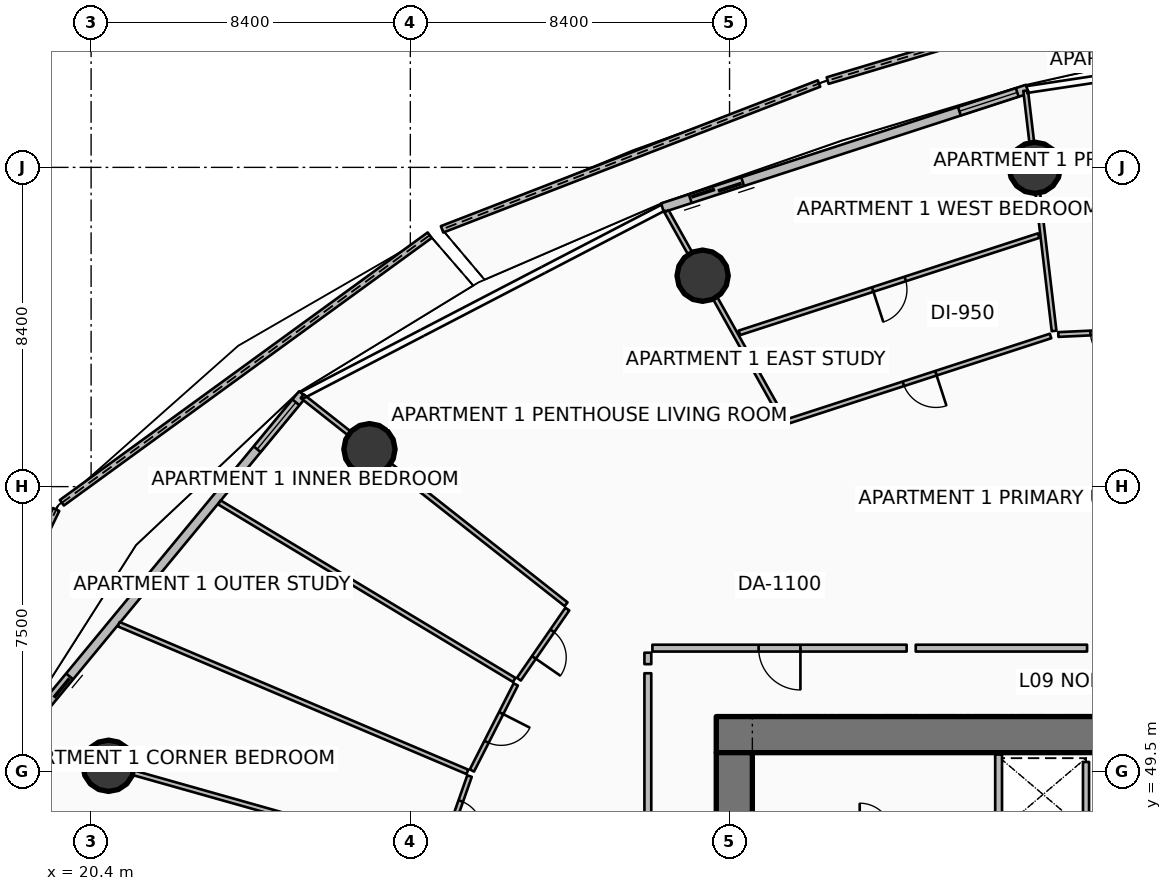
"""IFC4 building model, lengths in metres.
Left out: names, types, materials, properties, quantities, classifications, styles, units other than length and angle.
Written with IfcOpenShell. Run it as: python <this file> out.ifc"""

import sys

from ifc_helpers import new_model, si_unit, direction, frame, frame_2d, origin, origin_2d, place, context, subcontext, project, spatial, polyline, rectangle, circle, outline, extrude, element, fill, save


model = new_model("IFC4")
c1 = context("Model", 3, precision=1e-05, world=origin(), true_north=direction((0.0, 1.0)))
c2 = subcontext(c1, "Body", "Model", "MODEL_VIEW")
j1 = project(units=[si_unit("LENGTHUNIT", "METRE"), si_unit("PLANEANGLEUNIT", "RADIAN")], contexts=[c1])
p1 = place(None, origin())
s1 = spatial("IfcSite", under=j1, at=p1, CompositionType="ELEMENT")
p2 = place(p1, origin())
s2 = spatial("IfcBuilding", under=s1, at=p2, CompositionType="ELEMENT")
p3 = place(p2, frame((0.0, 0.0, 41.4)))
s3 = spatial("IfcBuildingStorey", under=s2, at=p3, CompositionType="ELEMENT", Elevation=41.4)
p4 = place(p3, frame((36.85, 50.475, 0.0), z_axis=(0.0, 0.0, 1.0), x_axis=(1.0, 0.0, 0.0)))
e1 = element("IfcWall", 1, at=p4, inside=s3, PredefinedType="SHEAR", context=c2, shape_type="SweptSolid", body=[
    extrude(rectangle(XDim=10.05, YDim=0.95, at=frame_2d((5.025, 0.0))), origin(), (0.0, 0.0, 1.0), 3.75),
])
p5 = place(p3, frame((37.325, 34.0, 0.0), z_axis=(0.0, 0.0, 1.0), x_axis=(0.0, 1.0, 0.0)))
e2 = element("IfcWall", 2, at=p5, inside=s3, PredefinedType="SHEAR", context=c2, shape_type="SweptSolid", body=[
    extrude(rectangle(XDim=16.0, YDim=0.95, at=frame_2d((8.0, 0.0))), origin(), (0.0, 0.0, 1.0), 3.75),
])
for number, where, z_axis, x_axis in (
    (3, (45.232, 65.389, 0.0), (0.0, 0.0, 1.0), (1.0, 0.0, 0.0)),
    (4, (36.492, 62.55, 0.0), (0.0, 0.0, 1.0), (1.0, 0.0, 0.0)),
    (5, (27.724, 57.984, 0.0), (0.0, 0.0, 1.0), (1.0, 0.0, 0.0)),
    (6, (20.859, 49.655, 0.0), (0.0, 0.0, 1.0), (1.0, 0.0, 0.0)),
):
    element("IfcColumn", number, at=place(p3, frame(where, z_axis=z_axis, x_axis=x_axis)), inside=s3, PredefinedType="COLUMN", context=c2, shape_type="SweptSolid", body=[
        extrude(circle(Radius=0.675, at=origin_2d()), origin(), (0.0, 0.0, 1.0), 3.5),
    ])
p6 = place(p3, frame((50.087, 70.771, 0.0), z_axis=(0.0, 0.0, 1.0), x_axis=(-0.957966698042, -0.286879426664, 0.0)))
e7 = element("IfcWall", 7, at=p6, inside=s3, PredefinedType="PARAPET", context=c2, shape_type="SweptSolid", body=[
    extrude(outline(polyline([(0.0, 0.0), (10.759, 0.0), (10.759, 1.148), (5.379, 1.284), (0.0, 1.483), (0.0, 0.0)])), frame((0.0, 0.09, 0.0), z_axis=(0.0, -1.0, 0.0), x_axis=(1.0, 0.0, 0.0)), (0.0, 0.0, 1.0), 0.18),
])
p7 = place(p3, frame((39.554, 67.606, 0.0), z_axis=(0.0, 0.0, 1.0), x_axis=(-0.932670029618, -0.360730669409, 0.0)))
e8 = element("IfcWall", 8, at=p7, inside=s3, PredefinedType="PARAPET", context=c2, shape_type="SweptSolid", body=[
    extrude(outline(polyline([(0.0, 0.0), (10.635, 0.0), (10.635, 1.224), (5.317, 1.127), (0.0, 1.148), (0.0, 0.0)])), frame((0.0, 0.09, 0.0), z_axis=(0.0, -1.0, 0.0), x_axis=(1.0, 0.0, 0.0)), (0.0, 0.0, 1.0), 0.18),
])
p8 = place(p3, frame((29.309, 63.615, 0.0), z_axis=(0.0, 0.0, 1.0), x_axis=(-0.808711385096, -0.588205657586, 0.0)))
e9 = element("IfcWall", 9, at=p8, inside=s3, PredefinedType="PARAPET", context=c2, shape_type="SweptSolid", body=[
    extrude(outline(polyline([(0.0, 0.0), (11.969, 0.0), (11.969, 1.632), (5.984, 1.418), (0.0, 1.233), (0.0, 0.0)])), frame((0.0, 0.09, 0.0), z_axis=(0.0, -1.0, 0.0), x_axis=(1.0, 0.0, 0.0)), (0.0, 0.0, 1.0), 0.18),
])
p9 = place(p3, frame((19.481, 56.396, 0.0), z_axis=(0.0, 0.0, 1.0), x_axis=(-0.435391138538, -0.900241387897, 0.0)))
e10 = element("IfcWall", 10, at=p9, inside=s3, PredefinedType="PARAPET", context=c2, shape_type="SweptSolid", body=[
    extrude(outline(polyline([(0.0, 0.0), (12.779, 0.0), (12.779, 1.86), (6.39, 1.798), (0.0, 1.632), (0.0, 0.0)])), frame((0.0, 0.09, 0.0), z_axis=(0.0, -1.0, 0.0), x_axis=(1.0, 0.0, 0.0)), (0.0, 0.0, 1.0), 0.18),
])
p10 = place(p3, frame((45.036, 67.458, 0.0), z_axis=(0.0, 0.0, 1.0), x_axis=(-0.951054679225, -0.309022648238, 0.0)))
e11 = element("IfcWall", 11, at=p10, inside=s3, PredefinedType="SOLIDWALL", context=c2, shape_type="SweptSolid", body=[
    extrude(rectangle(XDim=10.097, YDim=0.24, at=frame_2d((5.048, 0.0))), origin(), (0.0, 0.0, 1.0), 2.45),
])
p11 = place(p10, frame((7.877, 0.0, 0.0)))
e12 = element("IfcOpeningElement", 12, at=p11, cuts=e11, PredefinedType="OPENING", context=c2, shape_type="SweptSolid", body=[
    extrude(rectangle(XDim=1.45, YDim=2.15, at=frame_2d((0.725, 1.075))), frame((0.0, 0.13, 0.0), z_axis=(0.0, -1.0, 0.0), x_axis=(1.0, 0.0, 0.0)), (0.0, 0.0, 1.0), 0.26),
])
p12 = place(p10, frame((0.28, 0.0, 0.65)))
e13 = element("IfcOpeningElement", 13, at=p12, cuts=e11, PredefinedType="OPENING", context=c2, shape_type="SweptSolid", body=[
    extrude(rectangle(XDim=1.6, YDim=1.5, at=frame_2d((0.8, 0.75))), frame((0.0, 0.13, 0.0), z_axis=(0.0, -1.0, 0.0), x_axis=(1.0, 0.0, 0.0)), (0.0, 0.0, 1.0), 0.26),
])
p13 = place(p3, frame((25.967, 59.433, 0.0), z_axis=(0.0, 0.0, 1.0), x_axis=(-0.636674332663, -0.771132799281, 0.0)))
e14 = element("IfcWall", 14, at=p13, inside=s3, PredefinedType="SOLIDWALL", context=c2, shape_type="SweptSolid", body=[
    extrude(rectangle(XDim=11.851, YDim=0.24, at=frame_2d((5.926, 0.0))), origin(), (0.0, 0.0, 1.0), 2.45),
])
p14 = place(p13, frame((9.631, 0.0, 0.0)))
e15 = element("IfcOpeningElement", 15, at=p14, cuts=e14, PredefinedType="OPENING", context=c2, shape_type="SweptSolid", body=[
    extrude(rectangle(XDim=1.45, YDim=2.15, at=frame_2d((0.725, 1.075))), frame((0.0, 0.13, 0.0), z_axis=(0.0, -1.0, 0.0), x_axis=(1.0, 0.0, 0.0)), (0.0, 0.0, 1.0), 0.26),
])
p15 = place(p13, frame((0.28, 0.0, 0.65)))
e16 = element("IfcOpeningElement", 16, at=p15, cuts=e14, PredefinedType="OPENING", context=c2, shape_type="SweptSolid", body=[
    extrude(rectangle(XDim=1.6, YDim=1.5, at=frame_2d((0.8, 0.75))), frame((0.0, 0.13, 0.0), z_axis=(0.0, -1.0, 0.0), x_axis=(1.0, 0.0, 0.0)), (0.0, 0.0, 1.0), 0.26),
])
p16 = place(p3, frame((46.58, 48.045, 0.0), z_axis=(0.0, 0.0, 1.0), x_axis=(0.0, 1.0, 0.0)))
e17 = element("IfcWall", 17, at=p16, inside=s3, PredefinedType="PARTITIONING", context=c2, shape_type="SweptSolid", body=[
    extrude(rectangle(XDim=1.71, YDim=0.16, at=frame_2d((0.855, 0.0))), origin(), (0.0, 0.0, 1.0), 3.5),
])
p17 = place(p3, frame((44.28, 47.82, 0.0), z_axis=(0.0, 0.0, 1.0), x_axis=(0.0, 1.0, 0.0)))
e18 = element("IfcWall", 18, at=p17, inside=s3, PredefinedType="PARTITIONING", context=c2, shape_type="SweptSolid", body=[
    extrude(rectangle(XDim=2.13, YDim=0.18, at=frame_2d((1.065, 0.0))), origin(), (0.0, 0.0, 1.0), 3.5),
])
p18 = place(p3, frame((41.86, 52.75, 0.0), z_axis=(0.0, 0.0, 1.0), x_axis=(-1.0, 0.0, 0.0)))
e19 = element("IfcWall", 19, at=p18, inside=s3, PredefinedType="PARTITIONING", context=c2, shape_type="SweptSolid", body=[
    extrude(rectangle(XDim=6.69, YDim=0.18, at=frame_2d((3.345, 0.0))), origin(), (0.0, 0.0, 1.0), 2.867),
])
p19 = place(p18, frame((2.795, 0.0, 0.0)))
e20 = element("IfcOpeningElement", 20, at=p19, cuts=e19, PredefinedType="OPENING", context=c2, shape_type="SweptSolid", body=[
    extrude(rectangle(XDim=1.1, YDim=2.1, at=frame_2d((0.55, 1.05))), frame((0.0, 0.1, 0.0), z_axis=(0.0, -1.0, 0.0), x_axis=(1.0, 0.0, 0.0)), (0.0, 0.0, 1.0), 0.2),
])
p20 = place(p3, frame((35.05, 52.63, 0.0), z_axis=(0.0, 0.0, 1.0), x_axis=(0.0, -1.0, 0.0)))
e21 = element("IfcWall", 21, at=p20, inside=s3, PredefinedType="PARTITIONING", context=c2, shape_type="SweptSolid", body=[
    extrude(rectangle(XDim=0.301, YDim=0.18, at=frame_2d((0.15, 0.0))), origin(), (0.0, 0.0, 1.0), 2.867),
])
p21 = place(p3, frame((48.389, 61.121, 0.0), z_axis=(0.0, 0.0, 1.0), x_axis=(-0.998913125069, -0.046610820248, 0.0)))
e22 = element("IfcWall", 22, at=p21, inside=s3, PredefinedType="PARTITIONING", context=c2, shape_type="SweptSolid", body=[
    extrude(rectangle(XDim=2.54, YDim=0.125, at=frame_2d((1.27, 0.0))), origin(), (0.0, 0.0, 1.0), 2.94),
])
p22 = place(p21, frame((0.845, 0.0, 0.0)))
e23 = element("IfcOpeningElement", 23, at=p22, cuts=e22, PredefinedType="OPENING", context=c2, shape_type="SweptSolid", body=[
    extrude(rectangle(XDim=0.85, YDim=2.06, at=frame_2d((0.425, 1.03))), frame((0.0, 0.073, 0.0), z_axis=(0.0, -1.0, 0.0), x_axis=(1.0, 0.0, 0.0)), (0.0, 0.0, 1.0), 0.145),
])
p23 = place(p3, frame((46.608, 52.75, 0.0), z_axis=(0.0, 0.0, 1.0), x_axis=(-1.0, 0.0, 0.0)))
e24 = element("IfcWall", 24, at=p23, inside=s3, PredefinedType="PARTITIONING", context=c2, shape_type="SweptSolid", body=[
    extrude(rectangle(XDim=4.508, YDim=0.18, at=frame_2d((2.254, 0.0))), origin(), (0.0, 0.0, 1.0), 2.867),
])
p24 = place(p3, frame((45.74, 61.097, 0.0), z_axis=(0.0, 0.0, 1.0), x_axis=(-0.117513247181, 0.993071315031, 0.0)))
e25 = element("IfcWall", 25, at=p24, inside=s3, PredefinedType="PARTITIONING", context=c2, shape_type="SweptSolid", body=[
    extrude(rectangle(XDim=6.366, YDim=0.125, at=frame_2d((3.183, 0.0))), origin(), (0.0, 0.0, 1.0), 2.867),
])
p25 = place(p3, frame((38.604, 58.778, 0.0), z_axis=(0.0, 0.0, 1.0), x_axis=(-0.488617606889, 0.872498042541, 0.0)))
e26 = element("IfcWall", 26, at=p25, inside=s3, PredefinedType="PARTITIONING", context=c2, shape_type="SweptSolid", body=[
    extrude(rectangle(XDim=6.266, YDim=0.125, at=frame_2d((3.133, 0.0))), origin(), (0.0, 0.0, 1.0), 2.867),
])
p26 = place(p3, frame((45.647, 60.963, 0.0), z_axis=(0.0, 0.0, 1.0), x_axis=(-0.95105883225, -0.309009866509, 0.0)))
e27 = element("IfcWall", 27, at=p26, inside=s3, PredefinedType="PARTITIONING", context=c2, shape_type="SweptSolid", body=[
    extrude(rectangle(XDim=7.244, YDim=0.125, at=frame_2d((3.622, 0.0))), origin(), (0.0, 0.0, 1.0), 2.867),
])
p27 = place(p26, frame((3.172, 0.0, 0.0)))
e28 = element("IfcOpeningElement", 28, at=p27, cuts=e27, PredefinedType="OPENING", context=c2, shape_type="SweptSolid", body=[
    extrude(rectangle(XDim=0.9, YDim=2.08, at=frame_2d((0.45, 1.04))), frame((0.0, 0.073, 0.0), z_axis=(0.0, -1.0, 0.0), x_axis=(1.0, 0.0, 0.0)), (0.0, 0.0, 1.0), 0.145),
])
p28 = place(p3, frame((45.334, 63.605, 0.0), z_axis=(0.0, 0.0, 1.0), x_axis=(-0.951055512715, -0.309020083061, 0.0)))
e29 = element("IfcWall", 29, at=p28, inside=s3, PredefinedType="PARTITIONING", context=c2, shape_type="SweptSolid", body=[
    extrude(rectangle(XDim=8.282, YDim=0.125, at=frame_2d((4.141, 0.0))), origin(), (0.0, 0.0, 1.0), 2.867),
])
p29 = place(p28, frame((3.691, 0.0, 0.0)))
e30 = element("IfcOpeningElement", 30, at=p29, cuts=e29, PredefinedType="OPENING", context=c2, shape_type="SweptSolid", body=[
    extrude(rectangle(XDim=0.9, YDim=2.08, at=frame_2d((0.45, 1.04))), frame((0.0, 0.073, 0.0), z_axis=(0.0, -1.0, 0.0), x_axis=(1.0, 0.0, 0.0)), (0.0, 0.0, 1.0), 0.145),
])
p30 = place(p3, frame((35.05, 52.089, 0.0), z_axis=(0.0, 0.0, 1.0), x_axis=(0.0, -1.0, 0.0)))
e31 = element("IfcWall", 31, at=p30, inside=s3, PredefinedType="PARTITIONING", context=c2, shape_type="SweptSolid", body=[
    extrude(rectangle(XDim=6.317, YDim=0.18, at=frame_2d((3.158, 0.0))), origin(), (0.0, 0.0, 1.0), 2.867),
])
p31 = place(p3, frame((32.898, 53.905, 0.0), z_axis=(0.0, 0.0, 1.0), x_axis=(-0.78532854108, 0.619079221558, 0.0)))
e32 = element("IfcWall", 32, at=p31, inside=s3, PredefinedType="PARTITIONING", context=c2, shape_type="SweptSolid", body=[
    extrude(rectangle(XDim=8.842, YDim=0.125, at=frame_2d((4.421, 0.0))), origin(), (0.0, 0.0, 1.0), 2.867),
])
p32 = place(p3, frame((31.534, 51.913, 0.0), z_axis=(0.0, 0.0, 1.0), x_axis=(-0.856706990958, 0.515803384676, 0.0)))
e33 = element("IfcWall", 33, at=p32, inside=s3, PredefinedType="PARTITIONING", context=c2, shape_type="SweptSolid", body=[
    extrude(rectangle(XDim=9.057, YDim=0.125, at=frame_2d((4.528, 0.0))), origin(), (0.0, 0.0, 1.0), 2.94),
])
p33 = place(p3, frame((30.301, 49.494, 0.0), z_axis=(0.0, 0.0, 1.0), x_axis=(-0.920840746031, 0.389938867579, 0.0)))
e34 = element("IfcWall", 34, at=p33, inside=s3, PredefinedType="PARTITIONING", context=c2, shape_type="SweptSolid", body=[
    extrude(rectangle(XDim=9.966, YDim=0.125, at=frame_2d((4.983, 0.0))), origin(), (0.0, 0.0, 1.0), 2.94),
])
p34 = place(p3, frame((32.931, 53.778, 0.0), z_axis=(0.0, 0.0, 1.0), x_axis=(-0.568541738061, -0.822654418382, 0.0)))
e35 = element("IfcWall", 35, at=p34, inside=s3, PredefinedType="PARTITIONING", context=c2, shape_type="SweptSolid", body=[
    extrude(rectangle(XDim=2.242, YDim=0.125, at=frame_2d((1.121, 0.0))), origin(), (0.0, 0.0, 1.0), 2.867),
])
p35 = place(p34, frame((0.696, 0.0, 0.0)))
e36 = element("IfcOpeningElement", 36, at=p35, cuts=e35, PredefinedType="OPENING", context=c2, shape_type="SweptSolid", body=[
    extrude(rectangle(XDim=0.85, YDim=2.06, at=frame_2d((0.425, 1.03))), frame((0.0, 0.073, 0.0), z_axis=(0.0, -1.0, 0.0), x_axis=(1.0, 0.0, 0.0)), (0.0, 0.0, 1.0), 0.145),
])
p36 = place(p3, frame((31.575, 51.796, 0.0), z_axis=(0.0, 0.0, 1.0), x_axis=(-0.454037986735, -0.890982326762, 0.0)))
e37 = element("IfcWall", 37, at=p36, inside=s3, PredefinedType="PARTITIONING", context=c2, shape_type="SweptSolid", body=[
    extrude(rectangle(XDim=2.542, YDim=0.125, at=frame_2d((1.271, 0.0))), origin(), (0.0, 0.0, 1.0), 2.94),
])
p37 = place(p36, frame((0.846, 0.0, 0.0)))
e38 = element("IfcOpeningElement", 38, at=p37, cuts=e37, PredefinedType="OPENING", context=c2, shape_type="SweptSolid", body=[
    extrude(rectangle(XDim=0.85, YDim=2.06, at=frame_2d((0.425, 1.03))), frame((0.0, 0.073, 0.0), z_axis=(0.0, -1.0, 0.0), x_axis=(1.0, 0.0, 0.0)), (0.0, 0.0, 1.0), 0.145),
])
p38 = place(p3, frame((30.358, 49.384, 0.0), z_axis=(0.0, 0.0, 1.0), x_axis=(-0.331344536708, -0.943509829304, 0.0)))
e39 = element("IfcWall", 39, at=p38, inside=s3, PredefinedType="PARTITIONING", context=c2, shape_type="SweptSolid", body=[
    extrude(rectangle(XDim=2.242, YDim=0.125, at=frame_2d((1.121, 0.0))), origin(), (0.0, 0.0, 1.0), 2.867),
])
p39 = place(p38, frame((0.696, 0.0, 0.0)))
e40 = element("IfcOpeningElement", 40, at=p39, cuts=e39, PredefinedType="OPENING", context=c2, shape_type="SweptSolid", body=[
    extrude(rectangle(XDim=0.85, YDim=2.06, at=frame_2d((0.425, 1.03))), frame((0.0, 0.073, 0.0), z_axis=(0.0, -1.0, 0.0), x_axis=(1.0, 0.0, 0.0)), (0.0, 0.0, 1.0), 0.145),
])
p40 = place(p3, frame((29.492, 47.22, 0.0), z_axis=(0.0, 0.0, 1.0), x_axis=(-0.962454721813, 0.271442274635, 0.0)))
e41 = element("IfcWall", 41, at=p40, inside=s3, PredefinedType="PARTITIONING", context=c2, shape_type="SweptSolid", body=[
    extrude(rectangle(XDim=11.344, YDim=0.125, at=frame_2d((5.672, 0.0))), origin(), (0.0, 0.0, 1.0), 2.867),
])
p41 = place(p11, origin())
e42 = element("IfcDoor", 42, at=p41, inside=s3, OperationType="DOUBLE_DOOR_SLIDING", PredefinedType="DOOR", context=c2, shape_type="SweptSolid", body=[
    extrude(rectangle(XDim=1.45, YDim=2.15, at=frame_2d((0.725, 1.075))), frame((0.0, 0.025, 0.0), z_axis=(0.0, -1.0, 0.0), x_axis=(1.0, 0.0, 0.0)), (0.0, 0.0, 1.0), 0.05),
])
fill(e12, e42)
p42 = place(p12, origin())
e43 = element("IfcWindow", 43, at=p42, inside=s3, PartitioningType="SINGLE_PANEL", PredefinedType="WINDOW", context=c2, shape_type="SweptSolid", body=[
    extrude(rectangle(XDim=1.6, YDim=1.5, at=frame_2d((0.8, 0.75))), frame((0.0, 0.03, 0.0), z_axis=(0.0, -1.0, 0.0), x_axis=(1.0, 0.0, 0.0)), (0.0, 0.0, 1.0), 0.06),
])
fill(e13, e43)
p43 = place(p14, origin())
e44 = element("IfcDoor", 44, at=p43, inside=s3, OperationType="DOUBLE_DOOR_SLIDING", PredefinedType="DOOR", context=c2, shape_type="SweptSolid", body=[
    extrude(rectangle(XDim=1.45, YDim=2.15, at=frame_2d((0.725, 1.075))), frame((0.0, 0.025, 0.0), z_axis=(0.0, -1.0, 0.0), x_axis=(1.0, 0.0, 0.0)), (0.0, 0.0, 1.0), 0.05),
])
fill(e15, e44)
p44 = place(p15, origin())
e45 = element("IfcWindow", 45, at=p44, inside=s3, PartitioningType="SINGLE_PANEL", PredefinedType="WINDOW", context=c2, shape_type="SweptSolid", body=[
    extrude(rectangle(XDim=1.6, YDim=1.5, at=frame_2d((0.8, 0.75))), frame((0.0, 0.03, 0.0), z_axis=(0.0, -1.0, 0.0), x_axis=(1.0, 0.0, 0.0)), (0.0, 0.0, 1.0), 0.06),
])
fill(e16, e45)
p45 = place(p19, origin())
e46 = element("IfcDoor", 46, at=p45, inside=s3, OperationType="SINGLE_SWING_LEFT", PredefinedType="DOOR", context=c2, shape_type="SweptSolid", body=[
    extrude(rectangle(XDim=1.1, YDim=2.1, at=frame_2d((0.55, 1.05))), frame((0.0, 0.025, 0.0), z_axis=(0.0, -1.0, 0.0), x_axis=(1.0, 0.0, 0.0)), (0.0, 0.0, 1.0), 0.05),
])
fill(e20, e46)
p46 = place(p22, origin())
e47 = element("IfcDoor", 47, at=p46, inside=s3, OperationType="SINGLE_SWING_LEFT", PredefinedType="DOOR", context=c2, shape_type="SweptSolid", body=[
    extrude(rectangle(XDim=0.85, YDim=2.06, at=frame_2d((0.425, 1.03))), frame((0.0, 0.025, 0.0), z_axis=(0.0, -1.0, 0.0), x_axis=(1.0, 0.0, 0.0)), (0.0, 0.0, 1.0), 0.05),
])
fill(e23, e47)
p47 = place(p27, origin())
e48 = element("IfcDoor", 48, at=p47, inside=s3, OperationType="SINGLE_SWING_LEFT", PredefinedType="DOOR", context=c2, shape_type="SweptSolid", body=[
    extrude(rectangle(XDim=0.9, YDim=2.08, at=frame_2d((0.45, 1.04))), frame((0.0, 0.025, 0.0), z_axis=(0.0, -1.0, 0.0), x_axis=(1.0, 0.0, 0.0)), (0.0, 0.0, 1.0), 0.05),
])
fill(e28, e48)
p48 = place(p29, origin())
e49 = element("IfcDoor", 49, at=p48, inside=s3, OperationType="SINGLE_SWING_RIGHT", PredefinedType="DOOR", context=c2, shape_type="SweptSolid", body=[
    extrude(rectangle(XDim=0.9, YDim=2.08, at=frame_2d((0.45, 1.04))), frame((0.0, 0.025, 0.0), z_axis=(0.0, -1.0, 0.0), x_axis=(1.0, 0.0, 0.0)), (0.0, 0.0, 1.0), 0.05),
])
fill(e30, e49)
p49 = place(p35, origin())
e50 = element("IfcDoor", 50, at=p49, inside=s3, OperationType="SINGLE_SWING_RIGHT", PredefinedType="DOOR", context=c2, shape_type="SweptSolid", body=[
    extrude(rectangle(XDim=0.85, YDim=2.06, at=frame_2d((0.425, 1.03))), frame((0.0, 0.025, 0.0), z_axis=(0.0, -1.0, 0.0), x_axis=(1.0, 0.0, 0.0)), (0.0, 0.0, 1.0), 0.05),
])
fill(e36, e50)
p50 = place(p37, origin())
e51 = element("IfcDoor", 51, at=p50, inside=s3, OperationType="SINGLE_SWING_LEFT", PredefinedType="DOOR", context=c2, shape_type="SweptSolid", body=[
    extrude(rectangle(XDim=0.85, YDim=2.06, at=frame_2d((0.425, 1.03))), frame((0.0, 0.025, 0.0), z_axis=(0.0, -1.0, 0.0), x_axis=(1.0, 0.0, 0.0)), (0.0, 0.0, 1.0), 0.05),
])
fill(e38, e51)
p51 = place(p39, origin())
e52 = element("IfcDoor", 52, at=p51, inside=s3, OperationType="SINGLE_SWING_RIGHT", PredefinedType="DOOR", context=c2, shape_type="SweptSolid", body=[
    extrude(rectangle(XDim=0.85, YDim=2.06, at=frame_2d((0.425, 1.03))), frame((0.0, 0.025, 0.0), z_axis=(0.0, -1.0, 0.0), x_axis=(1.0, 0.0, 0.0)), (0.0, 0.0, 1.0), 0.05),
])
fill(e40, e52)
save(model, sys.argv[1])
